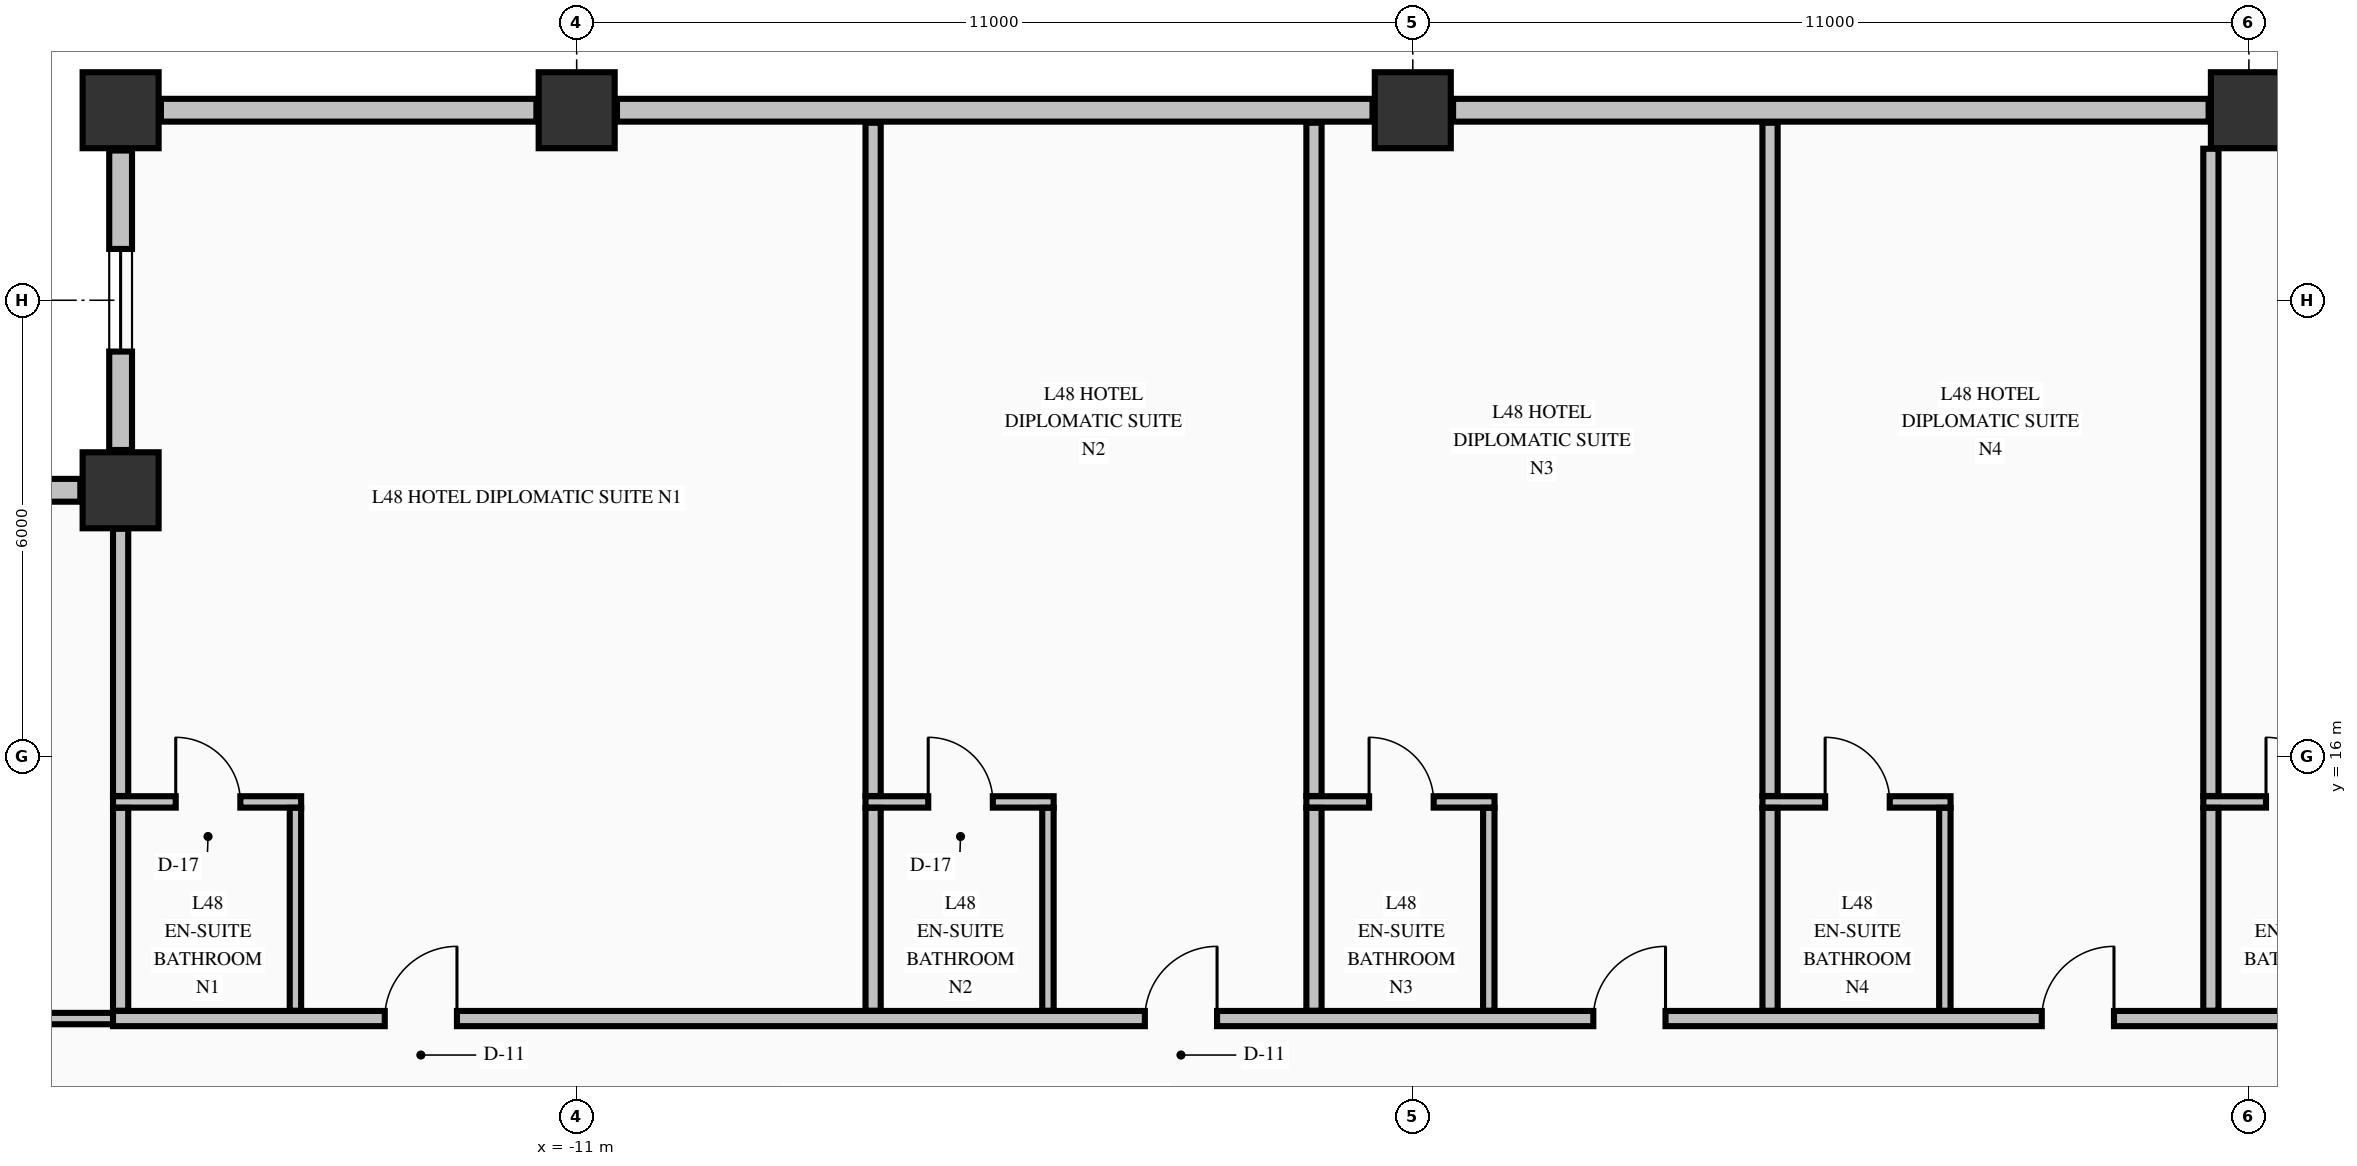
"""IFC4 building model, lengths in metres.
Left out: names, types, materials, properties, quantities, classifications, styles, units other than length and angle.
Written with IfcOpenShell. Run it as: python <this file> out.ifc"""

import sys

from ifc_helpers import new_model, si_unit, direction, frame, frame_2d, origin, origin_2d, place, context, subcontext, project, spatial, rectangle, extrude, element, fill, save


model = new_model("IFC4")
c1 = context("Model", 3, precision=1e-05, world=origin(), true_north=direction((0.0, 1.0)))
c2 = subcontext(c1, "Body", "Model", "MODEL_VIEW")
j1 = project(units=[si_unit("LENGTHUNIT", "METRE"), si_unit("PLANEANGLEUNIT", "RADIAN")], contexts=[c1])
p1 = place(None, origin())
s1 = spatial("IfcSite", under=j1, at=p1, CompositionType="ELEMENT")
p2 = place(p1, origin())
s2 = spatial("IfcBuilding", under=s1, at=p2, CompositionType="ELEMENT")
p3 = place(p2, frame((0.0, 0.0, 186.46)))
s3 = spatial("IfcBuildingStorey", under=s2, at=p3, CompositionType="ELEMENT", Elevation=186.46)
for number, where, z_axis, x_axis in (
    (1, (-17.0, 24.5, -0.425), (0.0, 0.0, 1.0), (1.0, 0.0, 0.0)),
    (2, (-11.0, 24.5, -0.425), (0.0, 0.0, 1.0), (1.0, 0.0, 0.0)),
    (3, (0.0, 24.5, -0.425), (0.0, 0.0, 1.0), (1.0, 0.0, 0.0)),
    (4, (11.0, 24.5, -0.425), (0.0, 0.0, 1.0), (1.0, 0.0, 0.0)),
    (5, (-17.0, 19.5, -0.425), (0.0, 0.0, 1.0), (1.0, 0.0, 0.0)),
):
    element("IfcColumn", number, at=place(p3, frame(where, z_axis=z_axis, x_axis=x_axis)), inside=s3, PredefinedType="COLUMN", context=c2, shape_type="SweptSolid", body=[
        extrude(rectangle(XDim=1.0, YDim=1.0, at=origin_2d()), origin(), (0.0, 0.0, 1.0), 5.0),
    ])
p4 = place(p3, frame((-17.0, 23.97, 0.0), z_axis=(0.0, 0.0, 1.0), x_axis=(0.0, -1.0, 0.0)))
e6 = element("IfcWall", 6, at=p4, inside=s3, PredefinedType="STANDARD", context=c2, shape_type="SweptSolid", body=[
    extrude(rectangle(XDim=3.94, YDim=0.3, at=frame_2d((1.97, 0.0))), origin(), (0.0, 0.0, 1.0), 2.767),
])
p5 = place(p4, frame((1.295, 0.0, 0.68)))
e7 = element("IfcOpeningElement", 7, at=p5, cuts=e6, PredefinedType="OPENING", context=c2, shape_type="SweptSolid", body=[
    extrude(rectangle(XDim=1.35, YDim=1.42, at=frame_2d((0.675, 0.71))), frame((0.0, 0.16, 0.0), z_axis=(0.0, -1.0, 0.0), x_axis=(1.0, 0.0, 0.0)), (0.0, 0.0, 1.0), 0.32),
])
p6 = place(p3, frame((-17.53, 19.5, 0.0), z_axis=(0.0, 0.0, 1.0), x_axis=(-1.0, 0.0, 0.0)))
e8 = element("IfcWall", 8, at=p6, inside=s3, PredefinedType="STANDARD", context=c2, shape_type="SweptSolid", body=[
    extrude(rectangle(XDim=3.94, YDim=0.3, at=frame_2d((1.97, 0.0))), origin(), (0.0, 0.0, 1.0), 2.167),
])
p7 = place(p3, frame((-11.53, 24.5, 0.0), z_axis=(0.0, 0.0, 1.0), x_axis=(-1.0, 0.0, 0.0)))
e9 = element("IfcWall", 9, at=p7, inside=s3, PredefinedType="STANDARD", context=c2, shape_type="SweptSolid", body=[
    extrude(rectangle(XDim=4.94, YDim=0.3, at=frame_2d((2.47, 0.0))), origin(), (0.0, 0.0, 1.0), 2.167),
])
for number, where, z_axis, x_axis in (
    (10, (-0.53, 24.5, 0.0), (0.0, 0.0, 1.0), (-1.0, 0.0, 0.0)),
    (11, (10.47, 24.5, 0.0), (0.0, 0.0, 1.0), (-1.0, 0.0, 0.0)),
):
    element("IfcWall", number, at=place(p3, frame(where, z_axis=z_axis, x_axis=x_axis)), inside=s3, PredefinedType="STANDARD", context=c2, shape_type="SweptSolid", body=[
        extrude(rectangle(XDim=9.94, YDim=0.3, at=frame_2d((4.97, 0.0))), origin(), (0.0, 0.0, 1.0), 2.167),
    ])
p8 = place(p3, frame((-20.075, 12.55, 0.0), z_axis=(0.0, 0.0, 1.0), x_axis=(1.0, 0.0, 0.0)))
e12 = element("IfcWall", 12, at=p8, inside=s3, PredefinedType="PARTITIONING", context=c2, shape_type="SweptSolid", body=[
    extrude(rectangle(XDim=3.175, YDim=0.15, at=frame_2d((1.587, 0.0))), origin(), (0.0, 0.0, 1.0), 4.575),
])
p9 = place(p3, frame((-17.1, 12.55, 0.0), z_axis=(0.0, 0.0, 1.0), x_axis=(1.0, 0.0, 0.0)))
e13 = element("IfcWall", 13, at=p9, inside=s3, PredefinedType="PARTITIONING", context=c2, shape_type="SweptSolid", body=[
    extrude(rectangle(XDim=39.2, YDim=0.2, at=frame_2d((19.6, 0.0))), origin(), (0.0, 0.0, 1.0), 4.575),
])
p10 = place(p9, frame((3.575, 0.0, 0.0)))
e14 = element("IfcOpeningElement", 14, at=p10, cuts=e13, PredefinedType="OPENING", context=c2, shape_type="SweptSolid", body=[
    extrude(rectangle(XDim=0.95, YDim=2.15, at=frame_2d((0.475, 1.075))), frame((0.0, 0.11, 0.0), z_axis=(0.0, -1.0, 0.0), x_axis=(1.0, 0.0, 0.0)), (0.0, 0.0, 1.0), 0.22),
])
p11 = place(p9, frame((13.575, 0.0, 0.0)))
e15 = element("IfcOpeningElement", 15, at=p11, cuts=e13, PredefinedType="OPENING", context=c2, shape_type="SweptSolid", body=[
    extrude(rectangle(XDim=0.95, YDim=2.15, at=frame_2d((0.475, 1.075))), frame((0.0, 0.11, 0.0), z_axis=(0.0, -1.0, 0.0), x_axis=(1.0, 0.0, 0.0)), (0.0, 0.0, 1.0), 0.22),
])
p12 = place(p9, frame((19.475, 0.0, 0.0)))
e16 = element("IfcOpeningElement", 16, at=p12, cuts=e13, PredefinedType="OPENING", context=c2, shape_type="SweptSolid", body=[
    extrude(rectangle(XDim=0.95, YDim=2.15, at=frame_2d((0.475, 1.075))), frame((0.0, 0.11, 0.0), z_axis=(0.0, -1.0, 0.0), x_axis=(1.0, 0.0, 0.0)), (0.0, 0.0, 1.0), 0.22),
])
p13 = place(p9, frame((25.375, 0.0, 0.0)))
e17 = element("IfcOpeningElement", 17, at=p13, cuts=e13, PredefinedType="OPENING", context=c2, shape_type="SweptSolid", body=[
    extrude(rectangle(XDim=0.95, YDim=2.15, at=frame_2d((0.475, 1.075))), frame((0.0, 0.11, 0.0), z_axis=(0.0, -1.0, 0.0), x_axis=(1.0, 0.0, 0.0)), (0.0, 0.0, 1.0), 0.22),
])
p14 = place(p9, frame((31.275, 0.0, 0.0)))
e18 = element("IfcOpeningElement", 18, at=p14, cuts=e13, PredefinedType="OPENING", context=c2, shape_type="SweptSolid", body=[
    extrude(rectangle(XDim=0.95, YDim=2.15, at=frame_2d((0.475, 1.075))), frame((0.0, 0.11, 0.0), z_axis=(0.0, -1.0, 0.0), x_axis=(1.0, 0.0, 0.0)), (0.0, 0.0, 1.0), 0.22),
])
p15 = place(p9, frame((37.295, 0.0, 0.0)))
e19 = element("IfcOpeningElement", 19, at=p15, cuts=e13, PredefinedType="OPENING", context=c2, shape_type="SweptSolid", body=[
    extrude(rectangle(XDim=0.95, YDim=2.15, at=frame_2d((0.475, 1.075))), frame((0.0, 0.11, 0.0), z_axis=(0.0, -1.0, 0.0), x_axis=(1.0, 0.0, 0.0)), (0.0, 0.0, 1.0), 0.22),
])
p16 = place(p3, frame((-17.1, 15.4, 0.0), z_axis=(0.0, 0.0, 1.0), x_axis=(1.0, 0.0, 0.0)))
e20 = element("IfcWall", 20, at=p16, inside=s3, PredefinedType="PARTITIONING", context=c2, shape_type="SweptSolid", body=[
    extrude(rectangle(XDim=2.475, YDim=0.15, at=frame_2d((1.238, 0.0))), origin(), (0.0, 0.0, 1.0), 4.575),
])
p17 = place(p16, frame((0.825, 0.0, 0.0)))
e21 = element("IfcOpeningElement", 21, at=p17, cuts=e20, PredefinedType="OPENING", context=c2, shape_type="SweptSolid", body=[
    extrude(rectangle(XDim=0.85, YDim=2.1, at=frame_2d((0.425, 1.05))), frame((0.0, 0.085, 0.0), z_axis=(0.0, -1.0, 0.0), x_axis=(1.0, 0.0, 0.0)), (0.0, 0.0, 1.0), 0.17),
])
p18 = place(p3, frame((-7.2, 15.4, 0.0), z_axis=(0.0, 0.0, 1.0), x_axis=(1.0, 0.0, 0.0)))
e22 = element("IfcWall", 22, at=p18, inside=s3, PredefinedType="PARTITIONING", context=c2, shape_type="SweptSolid", body=[
    extrude(rectangle(XDim=2.475, YDim=0.15, at=frame_2d((1.237, 0.0))), origin(), (0.0, 0.0, 1.0), 4.575),
])
p19 = place(p18, frame((0.825, 0.0, 0.0)))
e23 = element("IfcOpeningElement", 23, at=p19, cuts=e22, PredefinedType="OPENING", context=c2, shape_type="SweptSolid", body=[
    extrude(rectangle(XDim=0.85, YDim=2.1, at=frame_2d((0.425, 1.05))), frame((0.0, 0.085, 0.0), z_axis=(0.0, -1.0, 0.0), x_axis=(1.0, 0.0, 0.0)), (0.0, 0.0, 1.0), 0.17),
])
p20 = place(p3, frame((-1.4, 15.4, 0.0), z_axis=(0.0, 0.0, 1.0), x_axis=(1.0, 0.0, 0.0)))
e24 = element("IfcWall", 24, at=p20, inside=s3, PredefinedType="PARTITIONING", context=c2, shape_type="SweptSolid", body=[
    extrude(rectangle(XDim=2.475, YDim=0.15, at=frame_2d((1.237, 0.0))), origin(), (0.0, 0.0, 1.0), 4.575),
])
p21 = place(p20, frame((0.825, 0.0, 0.0)))
e25 = element("IfcOpeningElement", 25, at=p21, cuts=e24, PredefinedType="OPENING", context=c2, shape_type="SweptSolid", body=[
    extrude(rectangle(XDim=0.85, YDim=2.1, at=frame_2d((0.425, 1.05))), frame((0.0, 0.085, 0.0), z_axis=(0.0, -1.0, 0.0), x_axis=(1.0, 0.0, 0.0)), (0.0, 0.0, 1.0), 0.17),
])
p22 = place(p3, frame((4.6, 15.4, 0.0), z_axis=(0.0, 0.0, 1.0), x_axis=(1.0, 0.0, 0.0)))
e26 = element("IfcWall", 26, at=p22, inside=s3, PredefinedType="PARTITIONING", context=c2, shape_type="SweptSolid", body=[
    extrude(rectangle(XDim=2.475, YDim=0.15, at=frame_2d((1.237, 0.0))), origin(), (0.0, 0.0, 1.0), 4.575),
])
p23 = place(p22, frame((0.825, 0.0, 0.0)))
e27 = element("IfcOpeningElement", 27, at=p23, cuts=e26, PredefinedType="OPENING", context=c2, shape_type="SweptSolid", body=[
    extrude(rectangle(XDim=0.85, YDim=2.1, at=frame_2d((0.425, 1.05))), frame((0.0, 0.085, 0.0), z_axis=(0.0, -1.0, 0.0), x_axis=(1.0, 0.0, 0.0)), (0.0, 0.0, 1.0), 0.17),
])
p24 = place(p3, frame((10.4, 15.4, 0.0), z_axis=(0.0, 0.0, 1.0), x_axis=(1.0, 0.0, 0.0)))
e28 = element("IfcWall", 28, at=p24, inside=s3, PredefinedType="PARTITIONING", context=c2, shape_type="SweptSolid", body=[
    extrude(rectangle(XDim=2.475, YDim=0.15, at=frame_2d((1.238, 0.0))), origin(), (0.0, 0.0, 1.0), 4.575),
])
p25 = place(p24, frame((0.825, 0.0, 0.0)))
e29 = element("IfcOpeningElement", 29, at=p25, cuts=e28, PredefinedType="OPENING", context=c2, shape_type="SweptSolid", body=[
    extrude(rectangle(XDim=0.85, YDim=2.1, at=frame_2d((0.425, 1.05))), frame((0.0, 0.085, 0.0), z_axis=(0.0, -1.0, 0.0), x_axis=(1.0, 0.0, 0.0)), (0.0, 0.0, 1.0), 0.17),
])
p26 = place(p3, frame((-17.0, 12.653, 0.0), z_axis=(0.0, 0.0, 1.0), x_axis=(0.0, 1.0, 0.0)))
e30 = element("IfcWall", 30, at=p26, inside=s3, PredefinedType="PARTITIONING", context=c2, shape_type="SweptSolid", body=[
    extrude(rectangle(XDim=2.669, YDim=0.2, at=frame_2d((1.334, 0.0))), origin(), (0.0, 0.0, 1.0), 4.575),
])
p27 = place(p3, frame((-17.0, 15.478, 0.0), z_axis=(0.0, 0.0, 1.0), x_axis=(0.0, 1.0, 0.0)))
e31 = element("IfcWall", 31, at=p27, inside=s3, PredefinedType="PARTITIONING", context=c2, shape_type="SweptSolid", body=[
    extrude(rectangle(XDim=3.516, YDim=0.2, at=frame_2d((1.758, 0.0))), origin(), (0.0, 0.0, 1.0), 4.575),
])
p28 = place(p3, frame((-14.7, 12.653, 0.0), z_axis=(0.0, 0.0, 1.0), x_axis=(0.0, 1.0, 0.0)))
e32 = element("IfcWall", 32, at=p28, inside=s3, PredefinedType="PARTITIONING", context=c2, shape_type="SweptSolid", body=[
    extrude(rectangle(XDim=2.669, YDim=0.15, at=frame_2d((1.334, 0.0))), origin(), (0.0, 0.0, 1.0), 4.575),
])
p29 = place(p3, frame((-7.1, 12.653, 0.0), z_axis=(0.0, 0.0, 1.0), x_axis=(0.0, 1.0, 0.0)))
e33 = element("IfcWall", 33, at=p29, inside=s3, PredefinedType="PARTITIONING", context=c2, shape_type="SweptSolid", body=[
    extrude(rectangle(XDim=2.669, YDim=0.2, at=frame_2d((1.334, 0.0))), origin(), (0.0, 0.0, 1.0), 4.575),
])
p30 = place(p3, frame((-7.1, 15.478, 0.0), z_axis=(0.0, 0.0, 1.0), x_axis=(0.0, 1.0, 0.0)))
e34 = element("IfcWall", 34, at=p30, inside=s3, PredefinedType="PARTITIONING", context=c2, shape_type="SweptSolid", body=[
    extrude(rectangle(XDim=8.857, YDim=0.2, at=frame_2d((4.428, 0.0))), origin(), (0.0, 0.0, 1.0), 4.575),
])
p31 = place(p3, frame((-4.8, 12.653, 0.0), z_axis=(0.0, 0.0, 1.0), x_axis=(0.0, 1.0, 0.0)))
e35 = element("IfcWall", 35, at=p31, inside=s3, PredefinedType="PARTITIONING", context=c2, shape_type="SweptSolid", body=[
    extrude(rectangle(XDim=2.669, YDim=0.15, at=frame_2d((1.334, 0.0))), origin(), (0.0, 0.0, 1.0), 4.575),
])
p32 = place(p3, frame((-1.3, 12.653, 0.0), z_axis=(0.0, 0.0, 1.0), x_axis=(0.0, 1.0, 0.0)))
e36 = element("IfcWall", 36, at=p32, inside=s3, PredefinedType="PARTITIONING", context=c2, shape_type="SweptSolid", body=[
    extrude(rectangle(XDim=2.669, YDim=0.2, at=frame_2d((1.334, 0.0))), origin(), (0.0, 0.0, 1.0), 4.575),
])
p33 = place(p3, frame((-1.3, 15.478, 0.0), z_axis=(0.0, 0.0, 1.0), x_axis=(0.0, 1.0, 0.0)))
e37 = element("IfcWall", 37, at=p33, inside=s3, PredefinedType="PARTITIONING", context=c2, shape_type="SweptSolid", body=[
    extrude(rectangle(XDim=8.857, YDim=0.2, at=frame_2d((4.428, 0.0))), origin(), (0.0, 0.0, 1.0), 4.575),
])
p34 = place(p3, frame((1.0, 12.653, 0.0), z_axis=(0.0, 0.0, 1.0), x_axis=(0.0, 1.0, 0.0)))
e38 = element("IfcWall", 38, at=p34, inside=s3, PredefinedType="PARTITIONING", context=c2, shape_type="SweptSolid", body=[
    extrude(rectangle(XDim=2.669, YDim=0.15, at=frame_2d((1.334, 0.0))), origin(), (0.0, 0.0, 1.0), 4.575),
])
p35 = place(p3, frame((4.7, 12.653, 0.0), z_axis=(0.0, 0.0, 1.0), x_axis=(0.0, 1.0, 0.0)))
e39 = element("IfcWall", 39, at=p35, inside=s3, PredefinedType="PARTITIONING", context=c2, shape_type="SweptSolid", body=[
    extrude(rectangle(XDim=2.669, YDim=0.2, at=frame_2d((1.334, 0.0))), origin(), (0.0, 0.0, 1.0), 4.575),
])
p36 = place(p3, frame((4.7, 15.478, 0.0), z_axis=(0.0, 0.0, 1.0), x_axis=(0.0, 1.0, 0.0)))
e40 = element("IfcWall", 40, at=p36, inside=s3, PredefinedType="PARTITIONING", context=c2, shape_type="SweptSolid", body=[
    extrude(rectangle(XDim=8.857, YDim=0.2, at=frame_2d((4.428, 0.0))), origin(), (0.0, 0.0, 1.0), 4.575),
])
p37 = place(p3, frame((7.0, 12.653, 0.0), z_axis=(0.0, 0.0, 1.0), x_axis=(0.0, 1.0, 0.0)))
e41 = element("IfcWall", 41, at=p37, inside=s3, PredefinedType="PARTITIONING", context=c2, shape_type="SweptSolid", body=[
    extrude(rectangle(XDim=2.669, YDim=0.15, at=frame_2d((1.334, 0.0))), origin(), (0.0, 0.0, 1.0), 4.575),
])
p38 = place(p3, frame((10.5, 12.653, 0.0), z_axis=(0.0, 0.0, 1.0), x_axis=(0.0, 1.0, 0.0)))
e42 = element("IfcWall", 42, at=p38, inside=s3, PredefinedType="PARTITIONING", context=c2, shape_type="SweptSolid", body=[
    extrude(rectangle(XDim=2.669, YDim=0.2, at=frame_2d((1.334, 0.0))), origin(), (0.0, 0.0, 1.0), 2.167),
])
p39 = place(p3, frame((10.5, 15.478, 0.0), z_axis=(0.0, 0.0, 1.0), x_axis=(0.0, 1.0, 0.0)))
e43 = element("IfcWall", 43, at=p39, inside=s3, PredefinedType="PARTITIONING", context=c2, shape_type="SweptSolid", body=[
    extrude(rectangle(XDim=8.516, YDim=0.2, at=frame_2d((4.258, 0.0))), origin(), (0.0, 0.0, 1.0), 2.167),
])
p40 = place(p5, origin())
e44 = element("IfcWindow", 44, at=p40, inside=s3, PartitioningType="SINGLE_PANEL", PredefinedType="WINDOW", context=c2, shape_type="SweptSolid", body=[
    extrude(rectangle(XDim=1.35, YDim=1.42, at=frame_2d((0.675, 0.71))), frame((0.0, 0.03, 0.0), z_axis=(0.0, -1.0, 0.0), x_axis=(1.0, 0.0, 0.0)), (0.0, 0.0, 1.0), 0.06),
])
fill(e7, e44)
p41 = place(p10, origin())
e45 = element("IfcDoor", 45, at=p41, inside=s3, OperationType="SINGLE_SWING_RIGHT", PredefinedType="DOOR", context=c2, shape_type="SweptSolid", body=[
    extrude(rectangle(XDim=0.95, YDim=2.15, at=frame_2d((0.475, 1.075))), frame((0.0, 0.025, 0.0), z_axis=(0.0, -1.0, 0.0), x_axis=(1.0, 0.0, 0.0)), (0.0, 0.0, 1.0), 0.05),
])
fill(e14, e45)
p42 = place(p17, origin())
e46 = element("IfcDoor", 46, at=p42, inside=s3, OperationType="SINGLE_SWING_LEFT", PredefinedType="DOOR", context=c2, shape_type="SweptSolid", body=[
    extrude(rectangle(XDim=0.85, YDim=2.1, at=frame_2d((0.425, 1.05))), frame((0.0, 0.025, 0.0), z_axis=(0.0, -1.0, 0.0), x_axis=(1.0, 0.0, 0.0)), (0.0, 0.0, 1.0), 0.05),
])
fill(e21, e46)
p43 = place(p11, origin())
e47 = element("IfcDoor", 47, at=p43, inside=s3, OperationType="SINGLE_SWING_RIGHT", PredefinedType="DOOR", context=c2, shape_type="SweptSolid", body=[
    extrude(rectangle(XDim=0.95, YDim=2.15, at=frame_2d((0.475, 1.075))), frame((0.0, 0.025, 0.0), z_axis=(0.0, -1.0, 0.0), x_axis=(1.0, 0.0, 0.0)), (0.0, 0.0, 1.0), 0.05),
])
fill(e15, e47)
p44 = place(p19, origin())
e48 = element("IfcDoor", 48, at=p44, inside=s3, OperationType="SINGLE_SWING_LEFT", PredefinedType="DOOR", context=c2, shape_type="SweptSolid", body=[
    extrude(rectangle(XDim=0.85, YDim=2.1, at=frame_2d((0.425, 1.05))), frame((0.0, 0.025, 0.0), z_axis=(0.0, -1.0, 0.0), x_axis=(1.0, 0.0, 0.0)), (0.0, 0.0, 1.0), 0.05),
])
fill(e23, e48)
p45 = place(p12, origin())
e49 = element("IfcDoor", 49, at=p45, inside=s3, OperationType="SINGLE_SWING_RIGHT", PredefinedType="DOOR", context=c2, shape_type="SweptSolid", body=[
    extrude(rectangle(XDim=0.95, YDim=2.15, at=frame_2d((0.475, 1.075))), frame((0.0, 0.025, 0.0), z_axis=(0.0, -1.0, 0.0), x_axis=(1.0, 0.0, 0.0)), (0.0, 0.0, 1.0), 0.05),
])
fill(e16, e49)
p46 = place(p21, origin())
e50 = element("IfcDoor", 50, at=p46, inside=s3, OperationType="SINGLE_SWING_LEFT", PredefinedType="DOOR", context=c2, shape_type="SweptSolid", body=[
    extrude(rectangle(XDim=0.85, YDim=2.1, at=frame_2d((0.425, 1.05))), frame((0.0, 0.025, 0.0), z_axis=(0.0, -1.0, 0.0), x_axis=(1.0, 0.0, 0.0)), (0.0, 0.0, 1.0), 0.05),
])
fill(e25, e50)
p47 = place(p13, origin())
e51 = element("IfcDoor", 51, at=p47, inside=s3, OperationType="SINGLE_SWING_RIGHT", PredefinedType="DOOR", context=c2, shape_type="SweptSolid", body=[
    extrude(rectangle(XDim=0.95, YDim=2.15, at=frame_2d((0.475, 1.075))), frame((0.0, 0.025, 0.0), z_axis=(0.0, -1.0, 0.0), x_axis=(1.0, 0.0, 0.0)), (0.0, 0.0, 1.0), 0.05),
])
fill(e17, e51)
p48 = place(p23, origin())
e52 = element("IfcDoor", 52, at=p48, inside=s3, OperationType="SINGLE_SWING_LEFT", PredefinedType="DOOR", context=c2, shape_type="SweptSolid", body=[
    extrude(rectangle(XDim=0.85, YDim=2.1, at=frame_2d((0.425, 1.05))), frame((0.0, 0.025, 0.0), z_axis=(0.0, -1.0, 0.0), x_axis=(1.0, 0.0, 0.0)), (0.0, 0.0, 1.0), 0.05),
])
fill(e27, e52)
p49 = place(p25, origin())
e53 = element("IfcDoor", 53, at=p49, inside=s3, OperationType="SINGLE_SWING_LEFT", PredefinedType="DOOR", context=c2, shape_type="SweptSolid", body=[
    extrude(rectangle(XDim=0.85, YDim=2.1, at=frame_2d((0.425, 1.05))), frame((0.0, 0.025, 0.0), z_axis=(0.0, -1.0, 0.0), x_axis=(1.0, 0.0, 0.0)), (0.0, 0.0, 1.0), 0.05),
])
fill(e29, e53)
save(model, sys.argv[1])
